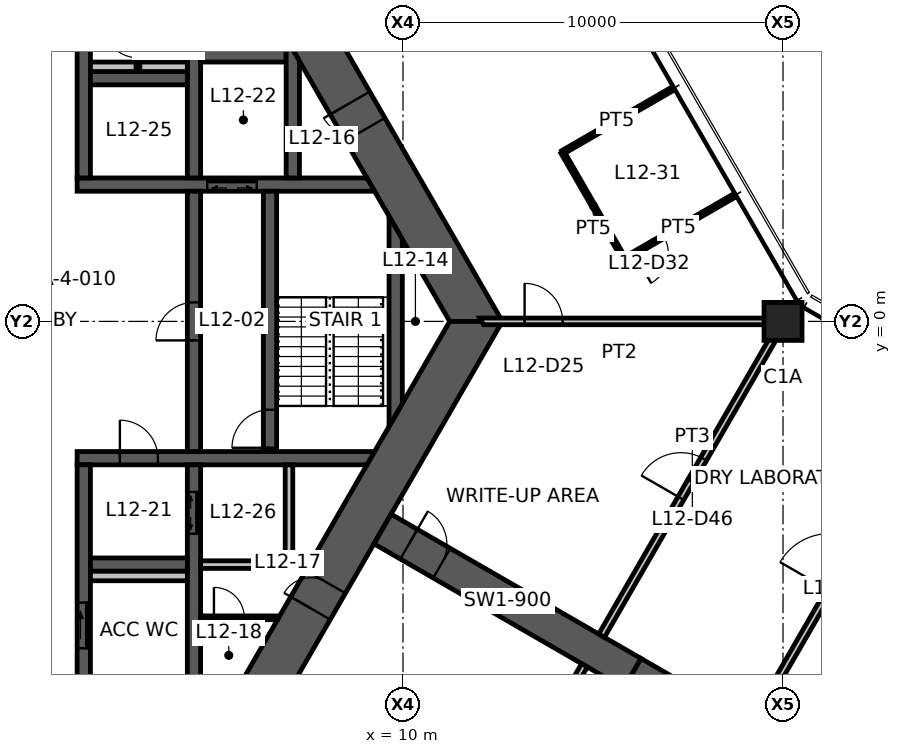
"""IFC4 building model, lengths in metres.
Left out: names, types, materials, properties, quantities, classifications, styles, units other than length and angle.
Written with IfcOpenShell. Run it as: python <this file> out.ifc"""

import sys

from ifc_helpers import new_model, si_unit, direction, frame, frame_2d, origin, origin_2d, place, context, subcontext, project, spatial, polyline, rectangle, hollow_rectangle, outline, extrude, element, fill, save


model = new_model("IFC4")
c1 = context("Model", 3, precision=1e-05, world=origin(), true_north=direction((0.0, 1.0)))
c2 = subcontext(c1, "Body", "Model", "MODEL_VIEW")
j1 = project(units=[si_unit("LENGTHUNIT", "METRE"), si_unit("PLANEANGLEUNIT", "RADIAN")], contexts=[c1])
p1 = place(None, origin())
s1 = spatial("IfcSite", under=j1, at=p1, CompositionType="ELEMENT")
p2 = place(p1, origin())
s2 = spatial("IfcBuilding", under=s1, at=p2, CompositionType="ELEMENT")
p3 = place(p2, frame((0.0, 0.0, 47.8)))
s3 = spatial("IfcBuildingStorey", under=s2, at=p3, CompositionType="ELEMENT", Elevation=47.8)
p4 = place(p3, frame((20.0, 0.0, 0.0), z_axis=(0.0, 0.0, 1.0), x_axis=(1.0, 0.0, 0.0)))
e1 = element("IfcColumn", 1, at=p4, inside=s3, PredefinedType="COLUMN", context=c2, shape_type="SweptSolid", body=[
    extrude(hollow_rectangle(XDim=1.0, YDim=1.0, WallThickness=0.06, at=origin_2d()), origin(), (0.0, 0.0, 1.0), 4.2),
])
p5 = place(p3, frame((11.922, 0.0, 0.0), z_axis=(0.0, 0.0, 1.0), x_axis=(-0.500004296715, 0.866022923061, 0.0)))
e2 = element("IfcWall", 2, at=p5, inside=s3, PredefinedType="SHEAR", context=c2, shape_type="SweptSolid", body=[
    extrude(outline(polyline([(-0.346, -0.6), (5.835, -0.6), (6.635, -0.6), (12.269, -0.6), (11.576, 0.6), (6.635, 0.6), (5.835, 0.6), (0.346, 0.6), (-0.346, -0.6)])), origin(), (0.0, 0.0, 1.0), 4.2),
])
p6 = place(p5, frame((5.835, 0.0, 0.0)))
e3 = element("IfcOpeningElement", 3, at=p6, cuts=e2, PredefinedType="OPENING", context=c2, shape_type="SweptSolid", body=[
    extrude(rectangle(XDim=0.8, YDim=2.1, at=frame_2d((0.4, 1.05))), frame((0.0, 0.61, 0.0), z_axis=(0.0, -1.0, 0.0), x_axis=(1.0, 0.0, 0.0)), (0.0, 0.0, 1.0), 1.22),
])
p7 = place(p3, frame((5.961, -10.325, 0.0), z_axis=(0.0, 0.0, 1.0), x_axis=(0.500004296715, 0.866022923061, 0.0)))
e4 = element("IfcWall", 4, at=p7, inside=s3, PredefinedType="SHEAR", context=c2, shape_type="SweptSolid", body=[
    extrude(outline(polyline([(-0.346, -0.6), (3.208, -0.6), (4.009, -0.6), (12.269, -0.6), (11.576, 0.6), (4.009, 0.6), (3.208, 0.6), (0.346, 0.6), (-0.346, -0.6)])), origin(), (0.0, 0.0, 1.0), 4.2),
])
p8 = place(p7, frame((3.208, 0.0, 0.0)))
e5 = element("IfcOpeningElement", 5, at=p8, cuts=e4, PredefinedType="OPENING", context=c2, shape_type="SweptSolid", body=[
    extrude(rectangle(XDim=0.8, YDim=2.1, at=frame_2d((0.4, 1.05))), frame((0.0, 0.61, 0.0), z_axis=(0.0, -1.0, 0.0), x_axis=(1.0, 0.0, 0.0)), (0.0, 0.0, 1.0), 1.22),
])
p9 = place(p3, frame((9.461, -5.462, 0.0), z_axis=(0.0, 0.0, 1.0), x_axis=(0.866019116917, -0.500010889016, 0.0)))
e6 = element("IfcWall", 6, at=p9, inside=s3, PredefinedType="SHEAR", context=c2, shape_type="SweptSolid", body=[
    extrude(rectangle(XDim=7.595, YDim=0.9, at=frame_2d((3.798, 0.0))), origin(), (0.0, 0.0, 1.0), 4.2),
])
p10 = place(p9, frame((0.8, 0.0, 0.0)))
e7 = element("IfcOpeningElement", 7, at=p10, cuts=e6, PredefinedType="OPENING", context=c2, shape_type="SweptSolid", body=[
    extrude(rectangle(XDim=1.0, YDim=2.1, at=frame_2d((0.5, 1.05))), frame((0.0, 0.46, 0.0), z_axis=(0.0, -1.0, 0.0), x_axis=(1.0, 0.0, 0.0)), (0.0, 0.0, 1.0), 0.92),
])
p11 = place(p3, frame((16.039, -9.26, 0.0), z_axis=(0.0, 0.0, 1.0), x_axis=(0.866024837091, -0.50000098154, 0.0)))
e8 = element("IfcWall", 8, at=p11, inside=s3, PredefinedType="SHEAR", context=c2, shape_type="SweptSolid", body=[
    extrude(rectangle(XDim=13.0, YDim=0.9, at=frame_2d((6.5, 0.0))), origin(), (0.0, 0.0, 1.0), 4.2),
])
p12 = place(p3, frame((1.425, 3.6, 0.0), z_axis=(0.0, 0.0, 1.0), x_axis=(1.0, 0.0, 0.0)))
e9 = element("IfcWall", 9, at=p12, inside=s3, PredefinedType="SHEAR", context=c2, shape_type="SweptSolid", body=[
    extrude(outline(polyline([(0.0, -0.175), (3.425, -0.175), (4.725, -0.175), (7.827, -0.175), (7.625, 0.175), (4.725, 0.175), (3.425, 0.175), (0.0, 0.175), (0.0, -0.175)])), origin(), (0.0, 0.0, 1.0), 4.2),
])
p13 = place(p12, frame((3.425, 0.0, 0.0)))
e10 = element("IfcOpeningElement", 10, at=p13, cuts=e9, PredefinedType="OPENING", context=c2, shape_type="SweptSolid", body=[
    extrude(rectangle(XDim=1.3, YDim=2.1, at=frame_2d((0.65, 1.05))), frame((0.0, 0.185, 0.0), z_axis=(0.0, -1.0, 0.0), x_axis=(1.0, 0.0, 0.0)), (0.0, 0.0, 1.0), 0.37),
])
p14 = place(p3, frame((1.425, -3.6, 0.0), z_axis=(0.0, 0.0, 1.0), x_axis=(1.0, 0.0, 0.0)))
e11 = element("IfcWall", 11, at=p14, inside=s3, PredefinedType="SHEAR", context=c2, shape_type="SweptSolid", body=[
    extrude(outline(polyline([(0.0, -0.175), (1.125, -0.175), (2.125, -0.175), (7.625, -0.175), (7.827, 0.175), (2.125, 0.175), (1.125, 0.175), (0.0, 0.175), (0.0, -0.175)])), origin(), (0.0, 0.0, 1.0), 4.2),
])
p15 = place(p14, frame((1.125, 0.0, 0.0)))
e12 = element("IfcOpeningElement", 12, at=p15, cuts=e11, PredefinedType="OPENING", context=c2, shape_type="SweptSolid", body=[
    extrude(rectangle(XDim=1.0, YDim=2.1, at=frame_2d((0.5, 1.05))), frame((0.0, 0.185, 0.0), z_axis=(0.0, -1.0, 0.0), x_axis=(1.0, 0.0, 0.0)), (0.0, 0.0, 1.0), 0.37),
])
p16 = place(p3, frame((1.6, 3.775, 0.0), z_axis=(0.0, 0.0, 1.0), x_axis=(0.0, 1.0, 0.0)))
e13 = element("IfcWall", 13, at=p16, inside=s3, PredefinedType="SHEAR", context=c2, shape_type="SweptSolid", body=[
    extrude(rectangle(XDim=5.95, YDim=0.35, at=frame_2d((2.975, 0.0))), origin(), (0.0, 0.0, 1.0), 4.2),
])
p17 = place(p16, frame((3.775, 0.0, 0.0)))
e14 = element("IfcOpeningElement", 14, at=p17, cuts=e13, PredefinedType="OPENING", context=c2, shape_type="SweptSolid", body=[
    extrude(rectangle(XDim=0.9, YDim=2.1, at=frame_2d((0.45, 1.05))), frame((0.0, 0.185, 0.0), z_axis=(0.0, -1.0, 0.0), x_axis=(1.0, 0.0, 0.0)), (0.0, 0.0, 1.0), 0.37),
])
p18 = place(p3, frame((1.6, -3.775, 0.0), z_axis=(0.0, 0.0, 1.0), x_axis=(0.0, -1.0, 0.0)))
e15 = element("IfcWall", 15, at=p18, inside=s3, PredefinedType="SHEAR", context=c2, shape_type="SweptSolid", body=[
    extrude(rectangle(XDim=5.95, YDim=0.35, at=frame_2d((2.975, 0.0))), origin(), (0.0, 0.0, 1.0), 4.2),
])
p19 = place(p18, frame((3.625, 0.0, 0.0)))
e16 = element("IfcOpeningElement", 16, at=p19, cuts=e15, PredefinedType="OPENING", context=c2, shape_type="SweptSolid", body=[
    extrude(rectangle(XDim=1.2, YDim=2.1, at=frame_2d((0.6, 1.05))), frame((0.0, 0.185, 0.0), z_axis=(0.0, -1.0, 0.0), x_axis=(1.0, 0.0, 0.0)), (0.0, 0.0, 1.0), 0.37),
])
p20 = place(p3, frame((4.5, -3.425, 0.0), z_axis=(0.0, 0.0, 1.0), x_axis=(0.0, 1.0, 0.0)))
e17 = element("IfcWall", 17, at=p20, inside=s3, PredefinedType="SHEAR", context=c2, shape_type="SweptSolid", body=[
    extrude(rectangle(XDim=6.85, YDim=0.35, at=frame_2d((3.425, 0.0))), origin(), (0.0, 0.0, 1.0), 4.2),
])
p21 = place(p20, frame((2.925, 0.0, 0.0)))
e18 = element("IfcOpeningElement", 18, at=p21, cuts=e17, PredefinedType="OPENING", context=c2, shape_type="SweptSolid", body=[
    extrude(rectangle(XDim=1.0, YDim=2.1, at=frame_2d((0.5, 1.05))), frame((0.0, 0.185, 0.0), z_axis=(0.0, -1.0, 0.0), x_axis=(1.0, 0.0, 0.0)), (0.0, 0.0, 1.0), 0.37),
])
p22 = place(p3, frame((6.5, -3.425, 0.0), z_axis=(0.0, 0.0, 1.0), x_axis=(0.0, 1.0, 0.0)))
e19 = element("IfcWall", 19, at=p22, inside=s3, PredefinedType="SHEAR", context=c2, shape_type="SweptSolid", body=[
    extrude(rectangle(XDim=6.85, YDim=0.35, at=frame_2d((3.425, 0.0))), origin(), (0.0, 0.0, 1.0), 4.2),
])
p23 = place(p22, frame((0.1, 0.0, 0.0)))
e20 = element("IfcOpeningElement", 20, at=p23, cuts=e19, PredefinedType="OPENING", context=c2, shape_type="SweptSolid", body=[
    extrude(rectangle(XDim=1.0, YDim=2.1, at=frame_2d((0.5, 1.05))), frame((0.0, 0.185, 0.0), z_axis=(0.0, -1.0, 0.0), x_axis=(1.0, 0.0, 0.0)), (0.0, 0.0, 1.0), 0.37),
])
p24 = place(p3, frame((4.5, 3.775, 0.0), z_axis=(0.0, 0.0, 1.0), x_axis=(0.0, 1.0, 0.0)))
e21 = element("IfcWall", 21, at=p24, inside=s3, PredefinedType="SHEAR", context=c2, shape_type="SweptSolid", body=[
    extrude(rectangle(XDim=3.4, YDim=0.35, at=frame_2d((1.7, 0.0))), origin(), (0.0, 0.0, 1.0), 4.2),
])
p25 = place(p3, frame((4.5, -3.775, 0.0), z_axis=(0.0, 0.0, 1.0), x_axis=(0.0, -1.0, 0.0)))
e22 = element("IfcWall", 22, at=p25, inside=s3, PredefinedType="SHEAR", context=c2, shape_type="SweptSolid", body=[
    extrude(rectangle(XDim=5.95, YDim=0.35, at=frame_2d((2.975, 0.0))), origin(), (0.0, 0.0, 1.0), 4.2),
])
p26 = place(p25, frame((0.712, 0.0, 0.0)))
e23 = element("IfcOpeningElement", 23, at=p26, cuts=e22, PredefinedType="OPENING", context=c2, shape_type="SweptSolid", body=[
    extrude(rectangle(XDim=1.1, YDim=2.1, at=frame_2d((0.55, 1.05))), frame((0.0, 0.185, 0.0), z_axis=(0.0, -1.0, 0.0), x_axis=(1.0, 0.0, 0.0)), (0.0, 0.0, 1.0), 0.37),
])
for number, where, z_axis, x_axis in (
    (24, (1.775, 6.4, 0.0), (0.0, 0.0, 1.0), (1.0, 0.0, 0.0)),
    (25, (1.775, -6.4, 0.0), (0.0, 0.0, 1.0), (1.0, 0.0, 0.0)),
):
    element("IfcWall", number, at=place(p3, frame(where, z_axis=z_axis, x_axis=x_axis)), inside=s3, PredefinedType="SHEAR", context=c2, shape_type="SweptSolid", body=[
        extrude(rectangle(XDim=2.55, YDim=0.35, at=frame_2d((1.275, 0.0))), origin(), (0.0, 0.0, 1.0), 4.2),
    ])
p27 = place(p3, frame((4.675, 7.0, 0.0), z_axis=(0.0, 0.0, 1.0), x_axis=(1.0, 0.0, 0.0)))
e26 = element("IfcWall", 26, at=p27, inside=s3, PredefinedType="SHEAR", context=c2, shape_type="SweptSolid", body=[
    extrude(rectangle(XDim=2.25, YDim=0.35, at=frame_2d((1.125, 0.0))), origin(), (0.0, 0.0, 1.0), 4.2),
])
p28 = place(p3, frame((7.1, 3.775, 0.0), z_axis=(0.0, 0.0, 1.0), x_axis=(0.0, 1.0, 0.0)))
e27 = element("IfcWall", 27, at=p28, inside=s3, PredefinedType="SHEAR", context=c2, shape_type="SweptSolid", body=[
    extrude(outline(polyline([(0.0, -0.175), (3.074, -0.175), (3.377, 0.0), (3.4, 0.175), (0.0, 0.175), (0.0, -0.175)])), origin(), (0.0, 0.0, 1.0), 4.2),
])
p29 = place(p3, frame((9.808, -2.462, 0.0), z_axis=(0.0, 0.0, 1.0), x_axis=(0.0, 1.0, 0.0)))
e28 = element("IfcWall", 28, at=p29, inside=s3, PredefinedType="SHEAR", context=c2, shape_type="SweptSolid", body=[
    extrude(outline(polyline([(0.303, -0.175), (4.621, -0.175), (5.228, 0.175), (-0.303, 0.175), (0.303, -0.175)])), origin(), (0.0, 0.0, 1.0), 4.2),
])
p30 = place(p3, frame((4.675, -6.4, 0.0), z_axis=(0.0, 0.0, 1.0), x_axis=(1.0, 0.0, 0.0)))
e29 = element("IfcWall", 29, at=p30, inside=s3, PredefinedType="STANDARD", context=c2, shape_type="SweptSolid", body=[
    extrude(rectangle(XDim=2.425, YDim=0.2, at=frame_2d((1.212, 0.0))), origin(), (0.0, 0.0, 1.0), 4.2),
])
p31 = place(p3, frame((7.0, -3.775, 0.0), z_axis=(0.0, 0.0, 1.0), x_axis=(0.0, -1.0, 0.0)))
e30 = element("IfcWall", 30, at=p31, inside=s3, PredefinedType="STANDARD", context=c2, shape_type="SweptSolid", body=[
    extrude(rectangle(XDim=2.525, YDim=0.2, at=frame_2d((1.263, 0.0))), origin(), (0.0, 0.0, 1.0), 4.2),
])
for number, where, z_axis, x_axis in (
    (31, (1.775, 6.7, 0.0), (0.0, 0.0, 1.0), (1.0, 0.0, 0.0)),
    (32, (1.775, -6.7, 0.0), (0.0, 0.0, 1.0), (1.0, 0.0, 0.0)),
):
    element("IfcWall", number, at=place(p3, frame(where, z_axis=z_axis, x_axis=x_axis)), inside=s3, PredefinedType="PLUMBINGWALL", context=c2, shape_type="SweptSolid", body=[
        extrude(rectangle(XDim=2.55, YDim=0.25, at=frame_2d((1.275, 0.0))), origin(), (0.0, 0.0, 1.0), 4.2),
    ])
p32 = place(p3, frame((3.025, 6.575, 0.0), z_axis=(0.0, 0.0, 1.0), x_axis=(0.0, 1.0, 0.0)))
e33 = element("IfcWall", 33, at=p32, inside=s3, PredefinedType="PARTITIONING", context=c2, shape_type="SweptSolid", body=[
    extrude(rectangle(XDim=3.15, YDim=0.1, at=frame_2d((1.575, 0.0))), origin(), (0.0, 0.0, 1.0), 2.65),
])
p33 = place(p32, frame((1.863, 0.0, 0.0)))
e34 = element("IfcOpeningElement", 34, at=p33, cuts=e33, PredefinedType="OPENING", context=c2, shape_type="SweptSolid", body=[
    extrude(rectangle(XDim=0.9, YDim=2.1, at=frame_2d((0.45, 1.05))), frame((0.0, 0.06, 0.0), z_axis=(0.0, -1.0, 0.0), x_axis=(1.0, 0.0, 0.0)), (0.0, 0.0, 1.0), 0.12),
])
p34 = place(p32, frame((0.363, 0.0, 0.0)))
e35 = element("IfcOpeningElement", 35, at=p34, cuts=e33, PredefinedType="OPENING", context=c2, shape_type="SweptSolid", body=[
    extrude(rectangle(XDim=0.9, YDim=2.1, at=frame_2d((0.45, 1.05))), frame((0.0, 0.06, 0.0), z_axis=(0.0, -1.0, 0.0), x_axis=(1.0, 0.0, 0.0)), (0.0, 0.0, 1.0), 0.12),
])
p35 = place(p3, frame((4.675, -7.8, 0.0), z_axis=(0.0, 0.0, 1.0), x_axis=(1.0, 0.0, 0.0)))
e36 = element("IfcWall", 36, at=p35, inside=s3, PredefinedType="PARTITIONING", context=c2, shape_type="SweptSolid", body=[
    extrude(outline(polyline([(0.0, -0.05), (0.35, -0.05), (1.15, -0.05), (2.022, -0.05), (2.051, 0.0), (2.057, 0.05), (1.15, 0.05), (0.35, 0.05), (0.0, 0.05), (0.0, -0.05)])), origin(), (0.0, 0.0, 1.0), 2.65),
])
p36 = place(p35, frame((0.35, 0.0, 0.0)))
e37 = element("IfcOpeningElement", 37, at=p36, cuts=e36, PredefinedType="OPENING", context=c2, shape_type="SweptSolid", body=[
    extrude(rectangle(XDim=0.8, YDim=2.1, at=frame_2d((0.4, 1.05))), frame((0.0, 0.06, 0.0), z_axis=(0.0, -1.0, 0.0), x_axis=(1.0, 0.0, 0.0)), (0.0, 0.0, 1.0), 0.12),
])
p37 = place(p3, frame((12.07, 0.0, 0.0), z_axis=(0.0, 0.0, 1.0), x_axis=(1.0, 0.0, 0.0)))
e38 = element("IfcWall", 38, at=p37, inside=s3, PredefinedType="PARTITIONING", context=c2, shape_type="SweptSolid", body=[
    extrude(outline(polyline([(0.051, -0.087), (1.129, -0.087), (2.129, -0.087), (7.93, -0.087), (7.93, 0.087), (2.129, 0.087), (1.129, 0.087), (-0.051, 0.087), (0.051, -0.087)])), origin(), (0.0, 0.0, 1.0), 3.05),
])
p38 = place(p37, frame((1.129, 0.0, 0.0)))
e39 = element("IfcOpeningElement", 39, at=p38, cuts=e38, PredefinedType="OPENING", context=c2, shape_type="SweptSolid", body=[
    extrude(rectangle(XDim=1.0, YDim=2.1, at=frame_2d((0.5, 1.05))), frame((0.0, 0.098, 0.0), z_axis=(0.0, -1.0, 0.0), x_axis=(1.0, 0.0, 0.0)), (0.0, 0.0, 1.0), 0.195),
])
p39 = place(p3, frame((14.198, 4.449, 0.0), z_axis=(0.0, 0.0, 1.0), x_axis=(0.866008333849, 0.50002956483, 0.0)))
e40 = element("IfcWall", 40, at=p39, inside=s3, PredefinedType="PARTITIONING", context=c2, shape_type="SweptSolid", body=[
    extrude(rectangle(XDim=3.28, YDim=0.1, at=frame_2d((1.64, 0.0))), origin(), (0.0, 0.0, 1.0), 2.65),
])
p40 = place(p3, frame((15.822, 1.637, 0.0), z_axis=(0.0, 0.0, 1.0), x_axis=(-0.500013214685, 0.866017774148, 0.0)))
e41 = element("IfcWall", 41, at=p40, inside=s3, PredefinedType="PARTITIONING", context=c2, shape_type="SweptSolid", body=[
    extrude(rectangle(XDim=3.247, YDim=0.1, at=frame_2d((1.623, 0.0))), origin(), (0.0, 0.0, 1.0), 2.65),
])
p41 = place(p3, frame((18.662, 3.277, 0.0), z_axis=(0.0, 0.0, 1.0), x_axis=(-0.866008333849, -0.50002956483, 0.0)))
e42 = element("IfcWall", 42, at=p41, inside=s3, PredefinedType="PARTITIONING", context=c2, shape_type="SweptSolid", body=[
    extrude(rectangle(XDim=3.28, YDim=0.1, at=frame_2d((1.64, 0.0))), origin(), (0.0, 0.0, 1.0), 2.65),
])
p42 = place(p41, frame((2.08, 0.0, 0.0)))
e43 = element("IfcOpeningElement", 43, at=p42, cuts=e42, PredefinedType="OPENING", context=c2, shape_type="SweptSolid", body=[
    extrude(rectangle(XDim=0.9, YDim=2.1, at=frame_2d((0.45, 1.05))), frame((0.0, 0.06, 0.0), z_axis=(0.0, -1.0, 0.0), x_axis=(1.0, 0.0, 0.0)), (0.0, 0.0, 1.0), 0.12),
])
p43 = place(p3, frame((15.225, -8.271, 0.0), z_axis=(0.0, 0.0, 1.0), x_axis=(0.499993908199, 0.866028920859, 0.0)))
e44 = element("IfcWall", 44, at=p43, inside=s3, PredefinedType="PARTITIONING", context=c2, shape_type="SweptSolid", body=[
    extrude(rectangle(XDim=9.55, YDim=0.175, at=frame_2d((4.775, 0.0))), origin(), (0.0, 0.0, 1.0), 2.95),
])
p44 = place(p43, frame((4.175, 0.0, 0.0)))
e45 = element("IfcOpeningElement", 45, at=p44, cuts=e44, PredefinedType="OPENING", context=c2, shape_type="SweptSolid", body=[
    extrude(rectangle(XDim=1.2, YDim=2.1, at=frame_2d((0.6, 1.05))), frame((0.0, 0.098, 0.0), z_axis=(0.0, -1.0, 0.0), x_axis=(1.0, 0.0, 0.0)), (0.0, 0.0, 1.0), 0.195),
])
p45 = place(p3, frame((19.209, -10.571, 0.0), z_axis=(0.0, 0.0, 1.0), x_axis=(0.500005203629, 0.866022399447, 0.0)))
e46 = element("IfcWall", 46, at=p45, inside=s3, PredefinedType="PARTITIONING", context=c2, shape_type="SweptSolid", body=[
    extrude(rectangle(XDim=10.14, YDim=0.175, at=frame_2d((5.07, 0.0))), origin(), (0.0, 0.0, 1.0), 3.95),
])
p46 = place(p45, frame((4.025, 0.0, 0.0)))
e47 = element("IfcOpeningElement", 47, at=p46, cuts=e46, PredefinedType="OPENING", context=c2, shape_type="SweptSolid", body=[
    extrude(rectangle(XDim=1.5, YDim=2.1, at=frame_2d((0.75, 1.05))), frame((0.0, 0.098, 0.0), z_axis=(0.0, -1.0, 0.0), x_axis=(1.0, 0.0, 0.0)), (0.0, 0.0, 1.0), 0.195),
])
p47 = place(p3, frame((14.775, -9.05, 0.0), z_axis=(0.0, 0.0, 1.0), x_axis=(-0.499993908199, -0.866028920859, 0.0)))
e48 = element("IfcWall", 48, at=p47, inside=s3, PredefinedType="PARTITIONING", context=c2, shape_type="SweptSolid", body=[
    extrude(rectangle(XDim=9.55, YDim=0.175, at=frame_2d((4.775, 0.0))), origin(), (0.0, 0.0, 1.0), 2.95),
])
p48 = place(p47, frame((4.175, 0.0, 0.0)))
e49 = element("IfcOpeningElement", 49, at=p48, cuts=e48, PredefinedType="OPENING", context=c2, shape_type="SweptSolid", body=[
    extrude(rectangle(XDim=1.2, YDim=2.1, at=frame_2d((0.6, 1.05))), frame((0.0, 0.098, 0.0), z_axis=(0.0, -1.0, 0.0), x_axis=(1.0, 0.0, 0.0)), (0.0, 0.0, 1.0), 0.195),
])
p49 = place(p6, origin())
e50 = element("IfcDoor", 50, at=p49, inside=s3, OperationType="SINGLE_SWING_RIGHT", PredefinedType="DOOR", context=c2, shape_type="SweptSolid", body=[
    extrude(rectangle(XDim=0.8, YDim=2.1, at=frame_2d((0.4, 1.05))), frame((0.0, 0.025, 0.0), z_axis=(0.0, -1.0, 0.0), x_axis=(1.0, 0.0, 0.0)), (0.0, 0.0, 1.0), 0.05),
])
fill(e3, e50)
p50 = place(p8, origin())
e51 = element("IfcDoor", 51, at=p50, inside=s3, OperationType="SINGLE_SWING_LEFT", PredefinedType="DOOR", context=c2, shape_type="SweptSolid", body=[
    extrude(rectangle(XDim=0.8, YDim=2.1, at=frame_2d((0.4, 1.05))), frame((0.0, 0.025, 0.0), z_axis=(0.0, -1.0, 0.0), x_axis=(1.0, 0.0, 0.0)), (0.0, 0.0, 1.0), 0.05),
])
fill(e5, e51)
p51 = place(p21, origin())
e52 = element("IfcDoor", 52, at=p51, inside=s3, OperationType="SINGLE_SWING_LEFT", PredefinedType="DOOR", context=c2, shape_type="SweptSolid", body=[
    extrude(rectangle(XDim=1.0, YDim=2.1, at=frame_2d((0.5, 1.05))), frame((0.0, 0.025, 0.0), z_axis=(0.0, -1.0, 0.0), x_axis=(1.0, 0.0, 0.0)), (0.0, 0.0, 1.0), 0.05),
])
fill(e18, e52)
p52 = place(p23, origin())
e53 = element("IfcDoor", 53, at=p52, inside=s3, OperationType="SINGLE_SWING_LEFT", PredefinedType="DOOR", context=c2, shape_type="SweptSolid", body=[
    extrude(rectangle(XDim=1.0, YDim=2.1, at=frame_2d((0.5, 1.05))), frame((0.0, 0.025, 0.0), z_axis=(0.0, -1.0, 0.0), x_axis=(1.0, 0.0, 0.0)), (0.0, 0.0, 1.0), 0.05),
])
fill(e20, e53)
p53 = place(p19, origin())
e54 = element("IfcDoor", 54, at=p53, inside=s3, OperationType="SLIDING_TO_LEFT", PredefinedType="DOOR", context=c2, shape_type="SweptSolid", body=[
    extrude(rectangle(XDim=1.2, YDim=2.1, at=frame_2d((0.6, 1.05))), frame((0.0, 0.025, 0.0), z_axis=(0.0, -1.0, 0.0), x_axis=(1.0, 0.0, 0.0)), (0.0, 0.0, 1.0), 0.05),
])
fill(e16, e54)
p54 = place(p15, origin())
e55 = element("IfcDoor", 55, at=p54, inside=s3, OperationType="SINGLE_SWING_LEFT", PredefinedType="DOOR", context=c2, shape_type="SweptSolid", body=[
    extrude(rectangle(XDim=1.0, YDim=2.1, at=frame_2d((0.5, 1.05))), frame((0.0, 0.025, 0.0), z_axis=(0.0, -1.0, 0.0), x_axis=(1.0, 0.0, 0.0)), (0.0, 0.0, 1.0), 0.05),
])
fill(e12, e55)
p55 = place(p10, origin())
e56 = element("IfcDoor", 56, at=p55, inside=s3, OperationType="SINGLE_SWING_LEFT", PredefinedType="DOOR", context=c2, shape_type="SweptSolid", body=[
    extrude(rectangle(XDim=1.0, YDim=2.1, at=frame_2d((0.5, 1.05))), frame((0.0, 0.025, 0.0), z_axis=(0.0, -1.0, 0.0), x_axis=(1.0, 0.0, 0.0)), (0.0, 0.0, 1.0), 0.05),
])
fill(e7, e56)
p56 = place(p34, origin())
e57 = element("IfcDoor", 57, at=p56, inside=s3, OperationType="SINGLE_SWING_RIGHT", PredefinedType="DOOR", context=c2, shape_type="SweptSolid", body=[
    extrude(rectangle(XDim=0.9, YDim=2.1, at=frame_2d((0.45, 1.05))), frame((0.0, 0.025, 0.0), z_axis=(0.0, -1.0, 0.0), x_axis=(1.0, 0.0, 0.0)), (0.0, 0.0, 1.0), 0.05),
])
fill(e35, e57)
p57 = place(p36, origin())
e58 = element("IfcDoor", 58, at=p57, inside=s3, OperationType="SINGLE_SWING_LEFT", PredefinedType="DOOR", context=c2, shape_type="SweptSolid", body=[
    extrude(rectangle(XDim=0.8, YDim=2.1, at=frame_2d((0.4, 1.05))), frame((0.0, 0.025, 0.0), z_axis=(0.0, -1.0, 0.0), x_axis=(1.0, 0.0, 0.0)), (0.0, 0.0, 1.0), 0.05),
])
fill(e37, e58)
p58 = place(p38, origin())
e59 = element("IfcDoor", 59, at=p58, inside=s3, OperationType="SINGLE_SWING_LEFT", PredefinedType="DOOR", context=c2, shape_type="SweptSolid", body=[
    extrude(rectangle(XDim=1.0, YDim=2.1, at=frame_2d((0.5, 1.05))), frame((0.0, 0.025, 0.0), z_axis=(0.0, -1.0, 0.0), x_axis=(1.0, 0.0, 0.0)), (0.0, 0.0, 1.0), 0.05),
])
fill(e39, e59)
p59 = place(p42, origin())
e60 = element("IfcDoor", 60, at=p59, inside=s3, OperationType="SINGLE_SWING_RIGHT", PredefinedType="DOOR", context=c2, shape_type="SweptSolid", body=[
    extrude(rectangle(XDim=0.9, YDim=2.1, at=frame_2d((0.45, 1.05))), frame((0.0, 0.025, 0.0), z_axis=(0.0, -1.0, 0.0), x_axis=(1.0, 0.0, 0.0)), (0.0, 0.0, 1.0), 0.05),
])
fill(e43, e60)
p60 = place(p44, origin())
e61 = element("IfcDoor", 61, at=p60, inside=s3, OperationType="DOUBLE_DOOR_SINGLE_SWING", PredefinedType="DOOR", context=c2, shape_type="SweptSolid", body=[
    extrude(rectangle(XDim=1.2, YDim=2.1, at=frame_2d((0.6, 1.05))), frame((0.0, 0.025, 0.0), z_axis=(0.0, -1.0, 0.0), x_axis=(1.0, 0.0, 0.0)), (0.0, 0.0, 1.0), 0.05),
])
fill(e45, e61)
p61 = place(p26, origin())
e62 = element("IfcDoor", 62, at=p61, inside=s3, OperationType="DOUBLE_DOOR_SLIDING", PredefinedType="DOOR", context=c2, shape_type="SweptSolid", body=[
    extrude(rectangle(XDim=1.1, YDim=2.1, at=frame_2d((0.55, 1.05))), frame((0.0, 0.025, 0.0), z_axis=(0.0, -1.0, 0.0), x_axis=(1.0, 0.0, 0.0)), (0.0, 0.0, 1.0), 0.05),
])
fill(e23, e62)
p62 = place(p13, origin())
e63 = element("IfcDoor", 63, at=p62, inside=s3, OperationType="DOUBLE_DOOR_SLIDING", PredefinedType="DOOR", context=c2, shape_type="SweptSolid", body=[
    extrude(rectangle(XDim=1.3, YDim=2.1, at=frame_2d((0.65, 1.05))), frame((0.0, 0.025, 0.0), z_axis=(0.0, -1.0, 0.0), x_axis=(1.0, 0.0, 0.0)), (0.0, 0.0, 1.0), 0.05),
])
fill(e10, e63)
save(model, sys.argv[1])
